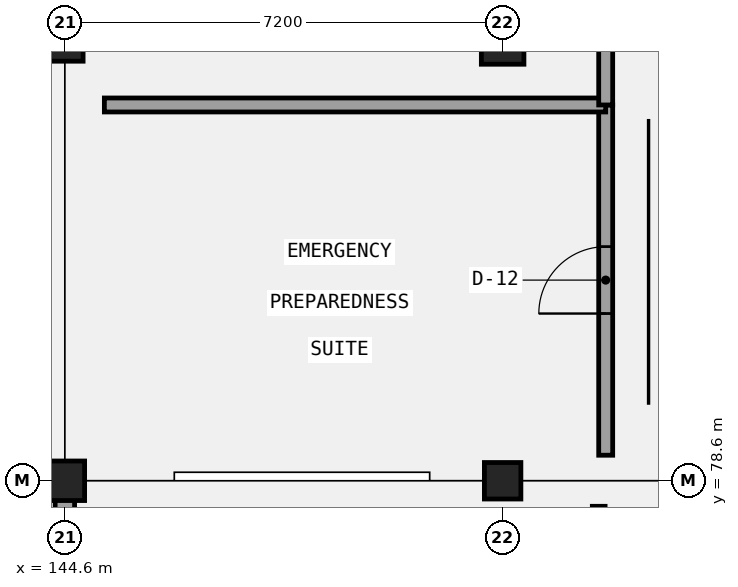
"""IFC4 building model, lengths in metres.
Left out: names, types, materials, properties, quantities, classifications, styles, units other than length and angle.
Written with IfcOpenShell. Run it as: python <this file> out.ifc"""

import sys

from ifc_helpers import new_model, si_unit, direction, frame, frame_2d, origin, origin_2d, place, context, subcontext, project, spatial, rectangle, circle, extrude, element, fill, save


model = new_model("IFC4")
c1 = context("Model", 3, precision=1e-05, world=origin(), true_north=direction((0.0, 1.0)))
c2 = subcontext(c1, "Body", "Model", "MODEL_VIEW")
j1 = project(units=[si_unit("LENGTHUNIT", "METRE"), si_unit("PLANEANGLEUNIT", "RADIAN")], contexts=[c1])
p1 = place(None, origin())
s1 = spatial("IfcSite", under=j1, at=p1, CompositionType="ELEMENT")
p2 = place(p1, origin())
s2 = spatial("IfcBuilding", under=s1, at=p2, CompositionType="ELEMENT")
p3 = place(p2, frame((0.0, 0.0, 9.6)))
s3 = spatial("IfcBuildingStorey", under=s2, at=p3, CompositionType="ELEMENT", Elevation=9.6)
p4 = place(p3, frame((144.6, 78.6, 0.0), z_axis=(0.0, 0.0, 1.0), x_axis=(1.0, 0.0, 0.0)))
e1 = element("IfcColumn", 1, at=p4, inside=s3, PredefinedType="COLUMN", context=c2, shape_type="SweptSolid", body=[
    extrude(circle(Radius=0.325, at=origin_2d()), origin(), (0.0, 0.0, 1.0), 4.2),
])
for number, where, z_axis, x_axis in (
    (2, (144.6, 85.8, 0.0), (0.0, 0.0, 1.0), (1.0, 0.0, 0.0)),
    (3, (151.8, 78.6, 0.0), (0.0, 0.0, 1.0), (1.0, 0.0, 0.0)),
):
    element("IfcColumn", number, at=place(p3, frame(where, z_axis=z_axis, x_axis=x_axis)), inside=s3, PredefinedType="COLUMN", context=c2, shape_type="SweptSolid", body=[
        extrude(rectangle(XDim=0.6, YDim=0.6, at=origin_2d()), origin(), (0.0, 0.0, 1.0), 4.2),
    ])
p5 = place(p3, frame((151.8, 85.8, 0.0), z_axis=(0.0, 0.0, 1.0), x_axis=(1.0, 0.0, 0.0)))
e4 = element("IfcColumn", 4, at=p5, inside=s3, PredefinedType="COLUMN", context=c2, shape_type="SweptSolid", body=[
    extrude(rectangle(XDim=0.7, YDim=0.7, at=origin_2d()), origin(), (0.0, 0.0, 1.0), 4.2),
])
p6 = place(p3, frame((108.45, 78.6, 0.0), z_axis=(0.0, 0.0, 1.0), x_axis=(1.0, 0.0, 0.0)))
e5 = element("IfcWall", 5, at=p6, inside=s3, PredefinedType="SOLIDWALL", context=c2, shape_type="SweptSolid", body=[
    extrude(rectangle(XDim=36.3, YDim=0.3, at=frame_2d((18.15, 0.0))), origin(), (0.0, 0.0, 1.0), 2.94),
])
p7 = place(p6, frame((2.95, 0.0, 0.95)))
e6 = element("IfcOpeningElement", 6, at=p7, cuts=e5, PredefinedType="OPENING", context=c2, shape_type="SweptSolid", body=[
    extrude(rectangle(XDim=1.6, YDim=1.4, at=frame_2d((0.8, 0.7))), frame((0.0, 0.16, 0.0), z_axis=(0.0, -1.0, 0.0), x_axis=(1.0, 0.0, 0.0)), (0.0, 0.0, 1.0), 0.32),
])
p8 = place(p6, frame((10.15, 0.0, 0.95)))
e7 = element("IfcOpeningElement", 7, at=p8, cuts=e5, PredefinedType="OPENING", context=c2, shape_type="SweptSolid", body=[
    extrude(rectangle(XDim=1.6, YDim=1.65, at=frame_2d((0.8, 0.825))), frame((0.0, 0.16, 0.0), z_axis=(0.0, -1.0, 0.0), x_axis=(1.0, 0.0, 0.0)), (0.0, 0.0, 1.0), 0.32),
])
p9 = place(p6, frame((17.25, 0.0, 0.95)))
e8 = element("IfcOpeningElement", 8, at=p9, cuts=e5, PredefinedType="OPENING", context=c2, shape_type="SweptSolid", body=[
    extrude(rectangle(XDim=1.8, YDim=1.4, at=frame_2d((0.9, 0.7))), frame((0.0, 0.16, 0.0), z_axis=(0.0, -1.0, 0.0), x_axis=(1.0, 0.0, 0.0)), (0.0, 0.0, 1.0), 0.32),
])
p10 = place(p6, frame((24.45, 0.0, 0.95)))
e9 = element("IfcOpeningElement", 9, at=p10, cuts=e5, PredefinedType="OPENING", context=c2, shape_type="SweptSolid", body=[
    extrude(rectangle(XDim=1.8, YDim=1.65, at=frame_2d((0.9, 0.825))), frame((0.0, 0.16, 0.0), z_axis=(0.0, -1.0, 0.0), x_axis=(1.0, 0.0, 0.0)), (0.0, 0.0, 1.0), 0.32),
])
p11 = place(p6, frame((31.55, 0.0, 0.95)))
e10 = element("IfcOpeningElement", 10, at=p11, cuts=e5, PredefinedType="OPENING", context=c2, shape_type="SweptSolid", body=[
    extrude(rectangle(XDim=2.0, YDim=1.4, at=frame_2d((1.0, 0.7))), frame((0.0, 0.16, 0.0), z_axis=(0.0, -1.0, 0.0), x_axis=(1.0, 0.0, 0.0)), (0.0, 0.0, 1.0), 0.32),
])
p12 = place(p3, frame((144.6, 78.44, 0.0), z_axis=(0.0, 0.0, 1.0), x_axis=(0.0, -1.0, 0.0)))
e11 = element("IfcWall", 11, at=p12, inside=s3, PredefinedType="SOLIDWALL", context=c2, shape_type="SweptSolid", body=[
    extrude(rectangle(XDim=42.88, YDim=0.32, at=frame_2d((21.44, 0.0))), origin(), (0.0, 0.0, 1.0), 2.94),
])
p13 = place(p12, frame((38.86, 0.0, 1.0)))
e12 = element("IfcOpeningElement", 12, at=p13, cuts=e11, PredefinedType="OPENING", context=c2, shape_type="SweptSolid", body=[
    extrude(rectangle(XDim=1.0, YDim=1.65, at=frame_2d((0.5, 0.825))), frame((0.0, 0.17, 0.0), z_axis=(0.0, -1.0, 0.0), x_axis=(1.0, 0.0, 0.0)), (0.0, 0.0, 1.0), 0.34),
])
p14 = place(p12, frame((31.74, 0.0, 1.0)))
e13 = element("IfcOpeningElement", 13, at=p14, cuts=e11, PredefinedType="OPENING", context=c2, shape_type="SweptSolid", body=[
    extrude(rectangle(XDim=1.0, YDim=1.65, at=frame_2d((0.5, 0.825))), frame((0.0, 0.17, 0.0), z_axis=(0.0, -1.0, 0.0), x_axis=(1.0, 0.0, 0.0)), (0.0, 0.0, 1.0), 0.34),
])
p15 = place(p12, frame((24.54, 0.0, 1.0)))
e14 = element("IfcOpeningElement", 14, at=p15, cuts=e11, PredefinedType="OPENING", context=c2, shape_type="SweptSolid", body=[
    extrude(rectangle(XDim=1.0, YDim=1.65, at=frame_2d((0.5, 0.825))), frame((0.0, 0.17, 0.0), z_axis=(0.0, -1.0, 0.0), x_axis=(1.0, 0.0, 0.0)), (0.0, 0.0, 1.0), 0.34),
])
p16 = place(p12, frame((17.34, 0.0, 1.0)))
e15 = element("IfcOpeningElement", 15, at=p16, cuts=e11, PredefinedType="OPENING", context=c2, shape_type="SweptSolid", body=[
    extrude(rectangle(XDim=1.0, YDim=1.65, at=frame_2d((0.5, 0.825))), frame((0.0, 0.17, 0.0), z_axis=(0.0, -1.0, 0.0), x_axis=(1.0, 0.0, 0.0)), (0.0, 0.0, 1.0), 0.34),
])
p17 = place(p12, frame((10.14, 0.0, 1.0)))
e16 = element("IfcOpeningElement", 16, at=p17, cuts=e11, PredefinedType="OPENING", context=c2, shape_type="SweptSolid", body=[
    extrude(rectangle(XDim=1.0, YDim=1.65, at=frame_2d((0.5, 0.825))), frame((0.0, 0.17, 0.0), z_axis=(0.0, -1.0, 0.0), x_axis=(1.0, 0.0, 0.0)), (0.0, 0.0, 1.0), 0.34),
])
p18 = place(p12, frame((3.02, 0.0, 1.0)))
e17 = element("IfcOpeningElement", 17, at=p18, cuts=e11, PredefinedType="OPENING", context=c2, shape_type="SweptSolid", body=[
    extrude(rectangle(XDim=1.0, YDim=1.65, at=frame_2d((0.5, 0.825))), frame((0.0, 0.17, 0.0), z_axis=(0.0, -1.0, 0.0), x_axis=(1.0, 0.0, 0.0)), (0.0, 0.0, 1.0), 0.34),
])
p19 = place(p3, frame((153.495, 79.02, 0.0), z_axis=(0.0, 0.0, 1.0), x_axis=(0.0, 1.0, 0.0)))
e18 = element("IfcWall", 18, at=p19, inside=s3, PredefinedType="PARTITIONING", context=c2, shape_type="SweptSolid", body=[
    extrude(rectangle(XDim=5.76, YDim=0.23, at=frame_2d((2.88, 0.0))), origin(), (0.0, 0.0, 1.0), 3.94),
])
p20 = place(p19, frame((2.33, 0.0, 0.0)))
e19 = element("IfcOpeningElement", 19, at=p20, cuts=e18, PredefinedType="OPENING", context=c2, shape_type="SweptSolid", body=[
    extrude(rectangle(XDim=1.1, YDim=2.35, at=frame_2d((0.55, 1.175))), frame((0.0, 0.125, 0.0), z_axis=(0.0, -1.0, 0.0), x_axis=(1.0, 0.0, 0.0)), (0.0, 0.0, 1.0), 0.25),
])
p21 = place(p3, frame((145.25, 84.78, 0.0), z_axis=(0.0, 0.0, 1.0), x_axis=(1.0, 0.0, 0.0)))
e20 = element("IfcWall", 20, at=p21, inside=s3, PredefinedType="PARTITIONING", context=c2, shape_type="SweptSolid", body=[
    extrude(rectangle(XDim=8.245, YDim=0.23, at=frame_2d((4.123, 0.0))), origin(), (0.0, 0.0, 1.0), 3.94),
])
p22 = place(p3, frame((153.495, 84.78, 0.0), z_axis=(0.0, 0.0, 1.0), x_axis=(0.0, 1.0, 0.0)))
e21 = element("IfcWall", 21, at=p22, inside=s3, PredefinedType="PARTITIONING", context=c2, shape_type="SweptSolid", body=[
    extrude(rectangle(XDim=5.76, YDim=0.23, at=frame_2d((2.88, 0.0))), origin(), (0.0, 0.0, 1.0), 3.94),
])
p23 = place(p22, frame((2.27, 0.0, 0.0)))
e22 = element("IfcOpeningElement", 22, at=p23, cuts=e21, PredefinedType="OPENING", context=c2, shape_type="SweptSolid", body=[
    extrude(rectangle(XDim=1.22, YDim=2.1, at=frame_2d((0.61, 1.05))), frame((0.0, 0.125, 0.0), z_axis=(0.0, -1.0, 0.0), x_axis=(1.0, 0.0, 0.0)), (0.0, 0.0, 1.0), 0.25),
])
p24 = place(p3, frame((153.38, 71.248, 0.0), z_axis=(0.0, 0.0, 1.0), x_axis=(0.0, 1.0, 0.0)))
e23 = element("IfcWall", 23, at=p24, inside=s3, PredefinedType="PARTITIONING", context=c2, shape_type="SweptSolid", body=[
    extrude(rectangle(XDim=6.932, YDim=0.21, at=frame_2d((3.466, 0.0))), origin(), (0.0, 0.0, 1.0), 3.94),
])
p25 = place(p24, frame((2.916, 0.0, 0.0)))
e24 = element("IfcOpeningElement", 24, at=p25, cuts=e23, PredefinedType="OPENING", context=c2, shape_type="SweptSolid", body=[
    extrude(rectangle(XDim=1.1, YDim=2.22, at=frame_2d((0.55, 1.11))), frame((0.0, 0.115, 0.0), z_axis=(0.0, -1.0, 0.0), x_axis=(1.0, 0.0, 0.0)), (0.0, 0.0, 1.0), 0.23),
])
p26 = place(p20, frame((1.1, 0.0, 0.0), z_axis=(0.0, 0.0, 1.0), x_axis=(-1.0, 0.0, 0.0)))
e25 = element("IfcDoor", 25, at=p26, inside=s3, OperationType="SINGLE_SWING_LEFT", PredefinedType="DOOR", context=c2, shape_type="SweptSolid", body=[
    extrude(rectangle(XDim=1.1, YDim=2.35, at=frame_2d((0.55, 1.175))), frame((0.0, 0.025, 0.0), z_axis=(0.0, -1.0, 0.0), x_axis=(1.0, 0.0, 0.0)), (0.0, 0.0, 1.0), 0.05),
])
fill(e19, e25)
save(model, sys.argv[1])
